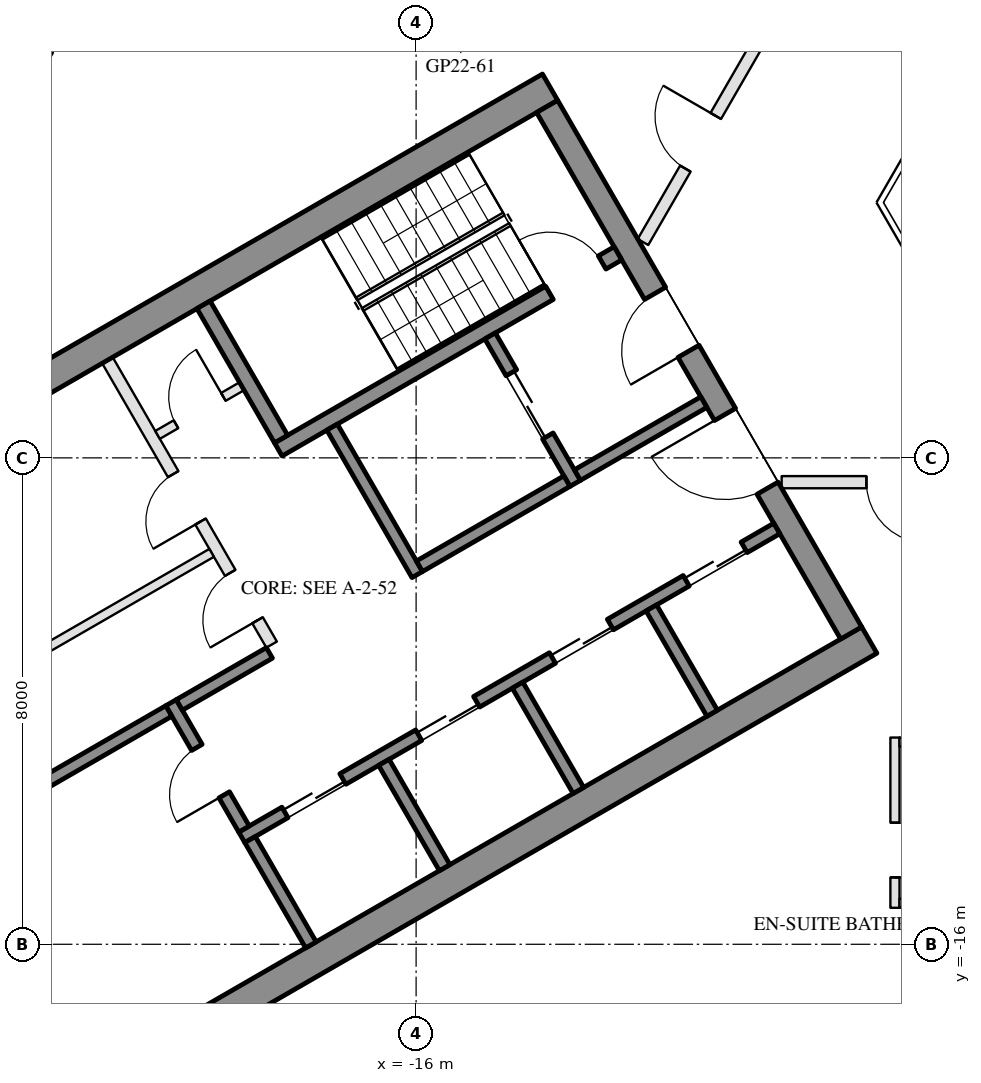
"""IFC4 building model, lengths in metres.
Left out: names, types, materials, properties, quantities, classifications, styles, units other than length and angle.
Written with IfcOpenShell. Run it as: python <this file> out.ifc"""

import sys

from ifc_helpers import new_model, si_unit, direction, frame, frame_2d, origin, place, context, subcontext, project, spatial, rectangle, extrude, element, fill, save


model = new_model("IFC4")
c1 = context("Model", 3, precision=1e-05, world=origin(), true_north=direction((0.0, 1.0)))
c2 = subcontext(c1, "Body", "Model", "MODEL_VIEW")
j1 = project(units=[si_unit("LENGTHUNIT", "METRE"), si_unit("PLANEANGLEUNIT", "RADIAN")], contexts=[c1])
p1 = place(None, origin())
s1 = spatial("IfcSite", under=j1, at=p1, CompositionType="ELEMENT")
p2 = place(p1, origin())
s2 = spatial("IfcBuilding", under=s1, at=p2, CompositionType="ELEMENT")
p3 = place(p2, frame((0.0, 0.0, 224.3)))
s3 = spatial("IfcBuildingStorey", under=s2, at=p3, CompositionType="ELEMENT", Elevation=224.3)
p4 = place(p3, frame((-20.309, 1.934, 0.0), z_axis=(0.0, 0.0, 1.0), x_axis=(-0.499992114976, -0.866029956157, 0.0)))
e1 = element("IfcWall", 1, at=p4, inside=s3, PredefinedType="SOLIDWALL", context=c2, shape_type="SweptSolid", body=[
    extrude(rectangle(XDim=6.74, YDim=0.35, at=frame_2d((3.37, 0.0))), origin(), (0.0, 0.0, 1.0), 3.55),
])
p5 = place(p4, frame((4.02, 0.0, 0.0)))
e2 = element("IfcOpeningElement", 2, at=p5, cuts=e1, PredefinedType="OPENING", context=c2, shape_type="SweptSolid", body=[
    extrude(rectangle(XDim=2.4, YDim=2.4, at=frame_2d((1.2, 1.2))), frame((0.0, 0.185, 0.0), z_axis=(0.0, -1.0, 0.0), x_axis=(1.0, 0.0, 0.0)), (0.0, 0.0, 1.0), 0.37),
])
p6 = place(p4, frame((0.77, 0.0, 0.3)))
e3 = element("IfcOpeningElement", 3, at=p6, cuts=e1, PredefinedType="OPENING", context=c2, shape_type="SweptSolid", body=[
    extrude(rectangle(XDim=2.9, YDim=2.65, at=frame_2d((1.45, 1.325))), frame((0.0, 0.185, 0.0), z_axis=(0.0, -1.0, 0.0), x_axis=(1.0, 0.0, 0.0)), (0.0, 0.0, 1.0), 0.37),
])
for number, where, z_axis, x_axis in (
    (4, (-13.797, -1.903, 0.0), (0.0, 0.0, 1.0), (-0.866, -0.5, 0.0)),
    (5, (-8.547, -10.997, 0.0), (0.0, 0.0, 1.0), (-0.866, -0.5, 0.0)),
):
    element("IfcWall", number, at=place(p3, frame(where, z_axis=z_axis, x_axis=x_axis)), inside=s3, PredefinedType="SHEAR", context=c2, shape_type="SweptSolid", body=[
        extrude(rectangle(XDim=14.837, YDim=0.5, at=frame_2d((7.418, 0.0))), origin(), (0.0, 0.0, 1.0), 3.5),
    ])
p7 = place(p3, frame((-13.845, -2.22, 0.0), z_axis=(0.0, 0.0, 1.0), x_axis=(0.500004234368, -0.866022959057, 0.0)))
e6 = element("IfcWall", 6, at=p7, inside=s3, PredefinedType="SHEAR", context=c2, shape_type="SweptSolid", body=[
    extrude(rectangle(XDim=10.0, YDim=0.4, at=frame_2d((5.0, 0.0))), origin(), (0.0, 0.0, 1.0), 3.5),
])
p8 = place(p7, frame((3.55, 0.0, 0.0)))
e7 = element("IfcOpeningElement", 7, at=p8, cuts=e6, PredefinedType="OPENING", context=c2, shape_type="SweptSolid", body=[
    extrude(rectangle(XDim=1.1, YDim=2.1, at=frame_2d((0.55, 1.05))), frame((0.0, 0.21, 0.0), z_axis=(0.0, -1.0, 0.0), x_axis=(1.0, 0.0, 0.0)), (0.0, 0.0, 1.0), 0.42),
])
p9 = place(p7, frame((5.85, 0.0, 0.0)))
e8 = element("IfcOpeningElement", 8, at=p9, cuts=e6, PredefinedType="OPENING", context=c2, shape_type="SweptSolid", body=[
    extrude(rectangle(XDim=1.4, YDim=2.1, at=frame_2d((0.7, 1.05))), frame((0.0, 0.21, 0.0), z_axis=(0.0, -1.0, 0.0), x_axis=(1.0, 0.0, 0.0)), (0.0, 0.0, 1.0), 0.42),
])
p10 = place(p3, frame((-12.681, -4.636, 0.0), z_axis=(0.0, 0.0, 1.0), x_axis=(-0.866021702275, -0.500006411147, 0.0)))
e9 = element("IfcWall", 9, at=p10, inside=s3, PredefinedType="SHEAR", context=c2, shape_type="SweptSolid", body=[
    extrude(rectangle(XDim=6.45, YDim=0.25, at=frame_2d((3.225, 0.0))), origin(), (0.0, 0.0, 1.0), 3.5),
])
p11 = place(p10, frame((0.3, 0.0, 0.0)))
e10 = element("IfcOpeningElement", 10, at=p11, cuts=e9, PredefinedType="OPENING", context=c2, shape_type="SweptSolid", body=[
    extrude(rectangle(XDim=1.0, YDim=2.1, at=frame_2d((0.5, 1.05))), frame((0.0, 0.135, 0.0), z_axis=(0.0, -1.0, 0.0), x_axis=(1.0, 0.0, 0.0)), (0.0, 0.0, 1.0), 0.27),
])
p12 = place(p3, frame((-19.496, -5.482, 0.0), z_axis=(0.0, 0.0, 1.0), x_axis=(0.499990435942, -0.866030925526, 0.0)))
e11 = element("IfcWall", 11, at=p12, inside=s3, PredefinedType="SHEAR", context=c2, shape_type="SweptSolid", body=[
    extrude(rectangle(XDim=2.55, YDim=0.25, at=frame_2d((1.275, 0.0))), origin(), (0.0, 0.0, 1.0), 3.5),
])
p13 = place(p3, frame((-17.381, -7.495, 0.0), z_axis=(0.0, 0.0, 1.0), x_axis=(0.500011755427, -0.866018616679, 0.0)))
e12 = element("IfcWall", 12, at=p13, inside=s3, PredefinedType="SHEAR", context=c2, shape_type="SweptSolid", body=[
    extrude(rectangle(XDim=2.8, YDim=0.2, at=frame_2d((1.4, 0.0))), origin(), (0.0, 0.0, 1.0), 3.5),
])
p14 = place(p3, frame((-14.783, -5.995, 0.0), z_axis=(0.0, 0.0, 1.0), x_axis=(0.49994636267, -0.866056369097, 0.0)))
e13 = element("IfcWall", 13, at=p14, inside=s3, PredefinedType="SHEAR", context=c2, shape_type="SweptSolid", body=[
    extrude(rectangle(XDim=2.8, YDim=0.2, at=frame_2d((1.4, 0.0))), origin(), (0.0, 0.0, 1.0), 3.5),
])
p15 = place(p14, frame((0.7, 0.0, 0.0)))
e14 = element("IfcOpeningElement", 14, at=p15, cuts=e13, PredefinedType="OPENING", context=c2, shape_type="SweptSolid", body=[
    extrude(rectangle(XDim=1.2, YDim=2.1, at=frame_2d((0.6, 1.05))), frame((0.0, 0.11, 0.0), z_axis=(0.0, -1.0, 0.0), x_axis=(1.0, 0.0, 0.0)), (0.0, 0.0, 1.0), 0.22),
])
p16 = place(p3, frame((-13.52, -8.383, 0.0), z_axis=(0.0, 0.0, 1.0), x_axis=(-0.866034573852, -0.49998411664, 0.0)))
e15 = element("IfcWall", 15, at=p16, inside=s3, PredefinedType="SHEAR", context=c2, shape_type="SweptSolid", body=[
    extrude(rectangle(XDim=2.8, YDim=0.2, at=frame_2d((1.4, 0.0))), origin(), (0.0, 0.0, 1.0), 3.5),
])
p17 = place(p3, frame((-11.268, -7.083, 0.0), z_axis=(0.0, 0.0, 1.0), x_axis=(-0.866050077142, -0.499957262057, 0.0)))
e16 = element("IfcWall", 16, at=p17, inside=s3, PredefinedType="SHEAR", context=c2, shape_type="SweptSolid", body=[
    extrude(rectangle(XDim=2.4, YDim=0.2, at=frame_2d((1.2, 0.0))), origin(), (0.0, 0.0, 1.0), 3.5),
])
p18 = place(p3, frame((-10.068, -9.162, 0.0), z_axis=(0.0, 0.0, 1.0), x_axis=(-0.866032725843, -0.499987317609, 0.0)))
e17 = element("IfcWall", 17, at=p18, inside=s3, PredefinedType="SHEAR", context=c2, shape_type="SweptSolid", body=[
    extrude(rectangle(XDim=10.16, YDim=0.2, at=frame_2d((5.08, 0.0))), origin(), (0.0, 0.0, 1.0), 3.5),
])
p19 = place(p18, frame((0.62, 0.0, 0.0)))
e18 = element("IfcOpeningElement", 18, at=p19, cuts=e17, PredefinedType="OPENING", context=c2, shape_type="SweptSolid", body=[
    extrude(rectangle(XDim=1.1, YDim=2.1, at=frame_2d((0.55, 1.05))), frame((0.0, 0.11, 0.0), z_axis=(0.0, -1.0, 0.0), x_axis=(1.0, 0.0, 0.0)), (0.0, 0.0, 1.0), 0.22),
])
p20 = place(p18, frame((3.16, 0.0, 0.0)))
e19 = element("IfcOpeningElement", 19, at=p20, cuts=e17, PredefinedType="OPENING", context=c2, shape_type="SweptSolid", body=[
    extrude(rectangle(XDim=1.1, YDim=2.1, at=frame_2d((0.55, 1.05))), frame((0.0, 0.11, 0.0), z_axis=(0.0, -1.0, 0.0), x_axis=(1.0, 0.0, 0.0)), (0.0, 0.0, 1.0), 0.22),
])
p21 = place(p18, frame((5.7, 0.0, 0.0)))
e20 = element("IfcOpeningElement", 20, at=p21, cuts=e17, PredefinedType="OPENING", context=c2, shape_type="SweptSolid", body=[
    extrude(rectangle(XDim=1.1, YDim=2.1, at=frame_2d((0.55, 1.05))), frame((0.0, 0.11, 0.0), z_axis=(0.0, -1.0, 0.0), x_axis=(1.0, 0.0, 0.0)), (0.0, 0.0, 1.0), 0.22),
])
p22 = place(p18, frame((8.24, 0.0, 0.0)))
e21 = element("IfcOpeningElement", 21, at=p22, cuts=e17, PredefinedType="OPENING", context=c2, shape_type="SweptSolid", body=[
    extrude(rectangle(XDim=1.1, YDim=2.1, at=frame_2d((0.55, 1.05))), frame((0.0, 0.11, 0.0), z_axis=(0.0, -1.0, 0.0), x_axis=(1.0, 0.0, 0.0)), (0.0, 0.0, 1.0), 0.22),
])
p23 = place(p3, frame((-20.031, -12.026, 0.0), z_axis=(0.0, 0.0, 1.0), x_axis=(0.500033551112, -0.866006032174, 0.0)))
e22 = element("IfcWall", 22, at=p23, inside=s3, PredefinedType="SHEAR", context=c2, shape_type="SweptSolid", body=[
    extrude(rectangle(XDim=2.4, YDim=0.2, at=frame_2d((1.2, 0.0))), origin(), (0.0, 0.0, 1.0), 3.5),
])
p24 = place(p23, frame((0.85, 0.0, 0.0)))
e23 = element("IfcOpeningElement", 23, at=p24, cuts=e22, PredefinedType="OPENING", context=c2, shape_type="SweptSolid", body=[
    extrude(rectangle(XDim=0.9, YDim=2.1, at=frame_2d((0.45, 1.05))), frame((0.0, 0.11, 0.0), z_axis=(0.0, -1.0, 0.0), x_axis=(1.0, 0.0, 0.0)), (0.0, 0.0, 1.0), 0.22),
])
p25 = place(p3, frame((-18.413, -11.208, 0.0), z_axis=(0.0, 0.0, 1.0), x_axis=(-0.866038183914, -0.499977863513, 0.0)))
e24 = element("IfcWall", 24, at=p25, inside=s3, PredefinedType="SHEAR", context=c2, shape_type="SweptSolid", body=[
    extrude(rectangle(XDim=1.71, YDim=0.2, at=frame_2d((0.855, 0.0))), origin(), (0.0, 0.0, 1.0), 3.5),
])
for number, where, z_axis, x_axis in (
    (25, (-12.131, -10.468, 0.0), (0.0, 0.0, 1.0), (0.5, -0.866, 0.0)),
    (26, (-14.331, -11.738, 0.0), (0.0, 0.0, 1.0), (0.5, -0.866, 0.0)),
    (27, (-16.531, -13.008, 0.0), (0.0, 0.0, 1.0), (0.5, -0.866, 0.0)),
    (28, (-18.73, -14.278, 0.0), (0.0, 0.0, 1.0), (0.5, -0.866, 0.0)),
):
    element("IfcWall", number, at=place(p3, frame(where, z_axis=z_axis, x_axis=x_axis)), inside=s3, PredefinedType="SHEAR", context=c2, shape_type="SweptSolid", body=[
        extrude(rectangle(XDim=2.0, YDim=0.2, at=frame_2d((1.0, 0.0))), origin(), (0.0, 0.0, 1.0), 3.5),
    ])
p26 = place(p3, frame((-20.067, -12.163, 0.0), z_axis=(0.0, 0.0, 1.0), x_axis=(-0.866055327414, -0.49994816717, 0.0)))
e29 = element("IfcWall", 29, at=p26, inside=s3, PredefinedType="SHEAR", context=c2, shape_type="SweptSolid", body=[
    extrude(rectangle(XDim=2.84, YDim=0.2, at=frame_2d((1.42, 0.0))), origin(), (0.0, 0.0, 1.0), 3.5),
])
p27 = place(p3, frame((-21.076, -6.395, 0.0), z_axis=(0.0, 0.0, 1.0), x_axis=(0.50001468107, -0.866016927499, 0.0)))
e30 = element("IfcWall", 30, at=p27, inside=s3, PredefinedType="PARTITIONING", context=c2, shape_type="SweptSolid", body=[
    extrude(rectangle(XDim=5.4, YDim=0.2, at=frame_2d((2.7, 0.0))), origin(), (0.0, 0.0, 1.0), 3.5),
])
p28 = place(p27, frame((2.163, 0.0, 0.0)))
e31 = element("IfcOpeningElement", 31, at=p28, cuts=e30, PredefinedType="OPENING", context=c2, shape_type="SweptSolid", body=[
    extrude(rectangle(XDim=0.9, YDim=2.1, at=frame_2d((0.45, 1.05))), frame((0.0, 0.11, 0.0), z_axis=(0.0, -1.0, 0.0), x_axis=(1.0, 0.0, 0.0)), (0.0, 0.0, 1.0), 0.22),
])
p29 = place(p27, frame((4.038, 0.0, 0.0)))
e32 = element("IfcOpeningElement", 32, at=p29, cuts=e30, PredefinedType="OPENING", context=c2, shape_type="SweptSolid", body=[
    extrude(rectangle(XDim=0.9, YDim=2.1, at=frame_2d((0.45, 1.05))), frame((0.0, 0.11, 0.0), z_axis=(0.0, -1.0, 0.0), x_axis=(1.0, 0.0, 0.0)), (0.0, 0.0, 1.0), 0.22),
])
p30 = place(p3, frame((-18.866, -6.822, 0.0), z_axis=(0.0, 0.0, 1.0), x_axis=(-0.866028054938, -0.499995408039, 0.0)))
e33 = element("IfcWall", 33, at=p30, inside=s3, PredefinedType="PARTITIONING", context=c2, shape_type="SweptSolid", body=[
    extrude(rectangle(XDim=1.6, YDim=0.15, at=frame_2d((0.8, 0.0))), origin(), (0.0, 0.0, 1.0), 3.5),
])
p31 = place(p30, frame((0.35, 0.0, 0.0)))
e34 = element("IfcOpeningElement", 34, at=p31, cuts=e33, PredefinedType="OPENING", context=c2, shape_type="SweptSolid", body=[
    extrude(rectangle(XDim=0.9, YDim=2.1, at=frame_2d((0.45, 1.05))), frame((0.0, 0.085, 0.0), z_axis=(0.0, -1.0, 0.0), x_axis=(1.0, 0.0, 0.0)), (0.0, 0.0, 1.0), 0.17),
])
p32 = place(p3, frame((-19.363, -9.562, 0.0), z_axis=(0.0, 0.0, 1.0), x_axis=(-0.866016523273, -0.500015381182, 0.0)))
e35 = element("IfcWall", 35, at=p32, inside=s3, PredefinedType="PARTITIONING", context=c2, shape_type="SweptSolid", body=[
    extrude(rectangle(XDim=6.95, YDim=0.15, at=frame_2d((3.475, 0.0))), origin(), (0.0, 0.0, 1.0), 3.5),
])
p33 = place(p3, frame((-6.2, -8.4, 0.0), z_axis=(0.0, 0.0, 1.0), x_axis=(-1.0, 0.0, 0.0)))
e36 = element("IfcWall", 36, at=p33, inside=s3, PredefinedType="PARTITIONING", context=c2, shape_type="SweptSolid", body=[
    extrude(rectangle(XDim=3.788, YDim=0.2, at=frame_2d((1.894, 0.0))), origin(), (0.0, 0.0, 1.0), 2.95),
])
p34 = place(p33, frame((1.394, 0.0, 0.0)))
e37 = element("IfcOpeningElement", 37, at=p34, cuts=e36, PredefinedType="OPENING", context=c2, shape_type="SweptSolid", body=[
    extrude(rectangle(XDim=1.0, YDim=2.1, at=frame_2d((0.5, 1.05))), frame((0.0, 0.11, 0.0), z_axis=(0.0, -1.0, 0.0), x_axis=(1.0, 0.0, 0.0)), (0.0, 0.0, 1.0), 0.22),
])
p35 = place(p3, frame((-8.125, -12.6, 0.0), z_axis=(0.0, 0.0, 1.0), x_axis=(0.0, -1.0, 0.0)))
e38 = element("IfcWall", 38, at=p35, inside=s3, PredefinedType="PARTITIONING", context=c2, shape_type="SweptSolid", body=[
    extrude(rectangle(XDim=2.8, YDim=0.15, at=frame_2d((1.4, 0.0))), origin(), (0.0, 0.0, 1.0), 3.55),
])
p36 = place(p35, frame((1.4, 0.0, 0.0)))
e39 = element("IfcOpeningElement", 39, at=p36, cuts=e38, PredefinedType="OPENING", context=c2, shape_type="SweptSolid", body=[
    extrude(rectangle(XDim=0.9, YDim=2.1, at=frame_2d((0.45, 1.05))), frame((0.0, 0.085, 0.0), z_axis=(0.0, -1.0, 0.0), x_axis=(1.0, 0.0, 0.0)), (0.0, 0.0, 1.0), 0.17),
])
for number, where, z_axis, x_axis in (
    (40, (-8.05, -15.325, 0.0), (0.0, 0.0, 1.0), (1.0, 0.0, 0.0)),
    (41, (-8.05, -12.675, 0.0), (0.0, 0.0, 1.0), (1.0, 0.0, 0.0)),
):
    element("IfcWall", number, at=place(p3, frame(where, z_axis=z_axis, x_axis=x_axis)), inside=s3, PredefinedType="PARTITIONING", context=c2, shape_type="SweptSolid", body=[
        extrude(rectangle(XDim=1.85, YDim=0.15, at=frame_2d((0.925, 0.0))), origin(), (0.0, 0.0, 1.0), 2.95),
    ])
p37 = place(p3, frame((-12.269, -4.45, 0.0), z_axis=(0.0, 0.0, 1.0), x_axis=(0.500055316652, 0.865993464345, 0.0)))
e42 = element("IfcWall", 42, at=p37, inside=s3, PredefinedType="PARTITIONING", context=c2, shape_type="SweptSolid", body=[
    extrude(rectangle(XDim=3.788, YDim=0.2, at=frame_2d((1.894, 0.0))), origin(), (0.0, 0.0, 1.0), 2.95),
])
p38 = place(p37, frame((1.394, 0.0, 0.0)))
e43 = element("IfcOpeningElement", 43, at=p38, cuts=e42, PredefinedType="OPENING", context=c2, shape_type="SweptSolid", body=[
    extrude(rectangle(XDim=1.0, YDim=2.1, at=frame_2d((0.5, 1.05))), frame((0.0, 0.11, 0.0), z_axis=(0.0, -1.0, 0.0), x_axis=(1.0, 0.0, 0.0)), (0.0, 0.0, 1.0), 0.22),
])
p39 = place(p15, origin())
e44 = element("IfcDoor", 44, at=p39, inside=s3, OperationType="DOUBLE_DOOR_SLIDING", PredefinedType="DOOR", context=c2, shape_type="SweptSolid", body=[
    extrude(rectangle(XDim=1.2, YDim=2.1, at=frame_2d((0.6, 1.05))), frame((0.0, 0.025, 0.0), z_axis=(0.0, -1.0, 0.0), x_axis=(1.0, 0.0, 0.0)), (0.0, 0.0, 1.0), 0.05),
])
fill(e14, e44)
p40 = place(p31, frame((0.9, 0.0, 0.0), z_axis=(0.0, 0.0, 1.0), x_axis=(-1.0, 0.0, 0.0)))
e45 = element("IfcDoor", 45, at=p40, inside=s3, OperationType="SINGLE_SWING_RIGHT", PredefinedType="DOOR", context=c2, shape_type="SweptSolid", body=[
    extrude(rectangle(XDim=0.9, YDim=2.1, at=frame_2d((0.45, 1.05))), frame((0.0, 0.025, 0.0), z_axis=(0.0, -1.0, 0.0), x_axis=(1.0, 0.0, 0.0)), (0.0, 0.0, 1.0), 0.05),
])
fill(e34, e45)
p41 = place(p19, origin())
e46 = element("IfcDoor", 46, at=p41, inside=s3, OperationType="DOUBLE_DOOR_SLIDING", PredefinedType="DOOR", context=c2, shape_type="SweptSolid", body=[
    extrude(rectangle(XDim=1.1, YDim=2.1, at=frame_2d((0.55, 1.05))), frame((0.0, 0.025, 0.0), z_axis=(0.0, -1.0, 0.0), x_axis=(1.0, 0.0, 0.0)), (0.0, 0.0, 1.0), 0.05),
])
fill(e18, e46)
p42 = place(p20, origin())
e47 = element("IfcDoor", 47, at=p42, inside=s3, OperationType="DOUBLE_DOOR_SLIDING", PredefinedType="DOOR", context=c2, shape_type="SweptSolid", body=[
    extrude(rectangle(XDim=1.1, YDim=2.1, at=frame_2d((0.55, 1.05))), frame((0.0, 0.025, 0.0), z_axis=(0.0, -1.0, 0.0), x_axis=(1.0, 0.0, 0.0)), (0.0, 0.0, 1.0), 0.05),
])
fill(e19, e47)
p43 = place(p21, origin())
e48 = element("IfcDoor", 48, at=p43, inside=s3, OperationType="DOUBLE_DOOR_SLIDING", PredefinedType="DOOR", context=c2, shape_type="SweptSolid", body=[
    extrude(rectangle(XDim=1.1, YDim=2.1, at=frame_2d((0.55, 1.05))), frame((0.0, 0.025, 0.0), z_axis=(0.0, -1.0, 0.0), x_axis=(1.0, 0.0, 0.0)), (0.0, 0.0, 1.0), 0.05),
])
fill(e20, e48)
p44 = place(p22, origin())
e49 = element("IfcDoor", 49, at=p44, inside=s3, OperationType="DOUBLE_DOOR_SLIDING", PredefinedType="DOOR", context=c2, shape_type="SweptSolid", body=[
    extrude(rectangle(XDim=1.1, YDim=2.1, at=frame_2d((0.55, 1.05))), frame((0.0, 0.025, 0.0), z_axis=(0.0, -1.0, 0.0), x_axis=(1.0, 0.0, 0.0)), (0.0, 0.0, 1.0), 0.05),
])
fill(e21, e49)
p45 = place(p24, frame((0.9, 0.0, 0.0), z_axis=(0.0, 0.0, 1.0), x_axis=(-1.0, 0.0, 0.0)))
e50 = element("IfcDoor", 50, at=p45, inside=s3, OperationType="SINGLE_SWING_LEFT", PredefinedType="DOOR", context=c2, shape_type="SweptSolid", body=[
    extrude(rectangle(XDim=0.9, YDim=2.1, at=frame_2d((0.45, 1.05))), frame((0.0, 0.025, 0.0), z_axis=(0.0, -1.0, 0.0), x_axis=(1.0, 0.0, 0.0)), (0.0, 0.0, 1.0), 0.05),
])
fill(e23, e50)
p46 = place(p28, frame((0.9, 0.0, 0.0), z_axis=(0.0, 0.0, 1.0), x_axis=(-1.0, 0.0, 0.0)))
e51 = element("IfcDoor", 51, at=p46, inside=s3, OperationType="SINGLE_SWING_LEFT", PredefinedType="DOOR", context=c2, shape_type="SweptSolid", body=[
    extrude(rectangle(XDim=0.9, YDim=2.1, at=frame_2d((0.45, 1.05))), frame((0.0, 0.025, 0.0), z_axis=(0.0, -1.0, 0.0), x_axis=(1.0, 0.0, 0.0)), (0.0, 0.0, 1.0), 0.05),
])
fill(e31, e51)
p47 = place(p29, frame((0.9, 0.0, 0.0), z_axis=(0.0, 0.0, 1.0), x_axis=(-1.0, 0.0, 0.0)))
e52 = element("IfcDoor", 52, at=p47, inside=s3, OperationType="SINGLE_SWING_LEFT", PredefinedType="DOOR", context=c2, shape_type="SweptSolid", body=[
    extrude(rectangle(XDim=0.9, YDim=2.1, at=frame_2d((0.45, 1.05))), frame((0.0, 0.025, 0.0), z_axis=(0.0, -1.0, 0.0), x_axis=(1.0, 0.0, 0.0)), (0.0, 0.0, 1.0), 0.05),
])
fill(e32, e52)
p48 = place(p8, frame((1.1, 0.0, 0.0), z_axis=(0.0, 0.0, 1.0), x_axis=(-1.0, 0.0, 0.0)))
e53 = element("IfcDoor", 53, at=p48, inside=s3, OperationType="SINGLE_SWING_LEFT", PredefinedType="DOOR", context=c2, shape_type="SweptSolid", body=[
    extrude(rectangle(XDim=1.1, YDim=2.1, at=frame_2d((0.55, 1.05))), frame((0.0, 0.025, 0.0), z_axis=(0.0, -1.0, 0.0), x_axis=(1.0, 0.0, 0.0)), (0.0, 0.0, 1.0), 0.05),
])
fill(e7, e53)
p49 = place(p9, frame((1.4, 0.0, 0.0), z_axis=(0.0, 0.0, 1.0), x_axis=(-1.0, 0.0, 0.0)))
e54 = element("IfcDoor", 54, at=p49, inside=s3, OperationType="DOUBLE_DOOR_SINGLE_SWING", PredefinedType="DOOR", context=c2, shape_type="SweptSolid", body=[
    extrude(rectangle(XDim=1.4, YDim=2.1, at=frame_2d((0.7, 1.05))), frame((0.0, 0.025, 0.0), z_axis=(0.0, -1.0, 0.0), x_axis=(1.0, 0.0, 0.0)), (0.0, 0.0, 1.0), 0.05),
])
fill(e8, e54)
p50 = place(p11, frame((1.0, 0.0, 0.0), z_axis=(0.0, 0.0, 1.0), x_axis=(-1.0, 0.0, 0.0)))
e55 = element("IfcDoor", 55, at=p50, inside=s3, OperationType="SINGLE_SWING_LEFT", PredefinedType="DOOR", context=c2, shape_type="SweptSolid", body=[
    extrude(rectangle(XDim=1.0, YDim=2.1, at=frame_2d((0.5, 1.05))), frame((0.0, 0.025, 0.0), z_axis=(0.0, -1.0, 0.0), x_axis=(1.0, 0.0, 0.0)), (0.0, 0.0, 1.0), 0.05),
])
fill(e10, e55)
p51 = place(p36, origin())
e56 = element("IfcDoor", 56, at=p51, inside=s3, OperationType="SINGLE_SWING_RIGHT", PredefinedType="DOOR", context=c2, shape_type="SweptSolid", body=[
    extrude(rectangle(XDim=0.9, YDim=2.1, at=frame_2d((0.45, 1.05))), frame((0.0, 0.025, 0.0), z_axis=(0.0, -1.0, 0.0), x_axis=(1.0, 0.0, 0.0)), (0.0, 0.0, 1.0), 0.05),
])
fill(e39, e56)
p52 = place(p34, origin())
e57 = element("IfcDoor", 57, at=p52, inside=s3, OperationType="SINGLE_SWING_LEFT", PredefinedType="DOOR", context=c2, shape_type="SweptSolid", body=[
    extrude(rectangle(XDim=1.0, YDim=2.1, at=frame_2d((0.5, 1.05))), frame((0.0, 0.025, 0.0), z_axis=(0.0, -1.0, 0.0), x_axis=(1.0, 0.0, 0.0)), (0.0, 0.0, 1.0), 0.05),
])
fill(e37, e57)
p53 = place(p38, origin())
e58 = element("IfcDoor", 58, at=p53, inside=s3, OperationType="SINGLE_SWING_RIGHT", PredefinedType="DOOR", context=c2, shape_type="SweptSolid", body=[
    extrude(rectangle(XDim=1.0, YDim=2.1, at=frame_2d((0.5, 1.05))), frame((0.0, 0.025, 0.0), z_axis=(0.0, -1.0, 0.0), x_axis=(1.0, 0.0, 0.0)), (0.0, 0.0, 1.0), 0.05),
])
fill(e43, e58)
save(model, sys.argv[1])
